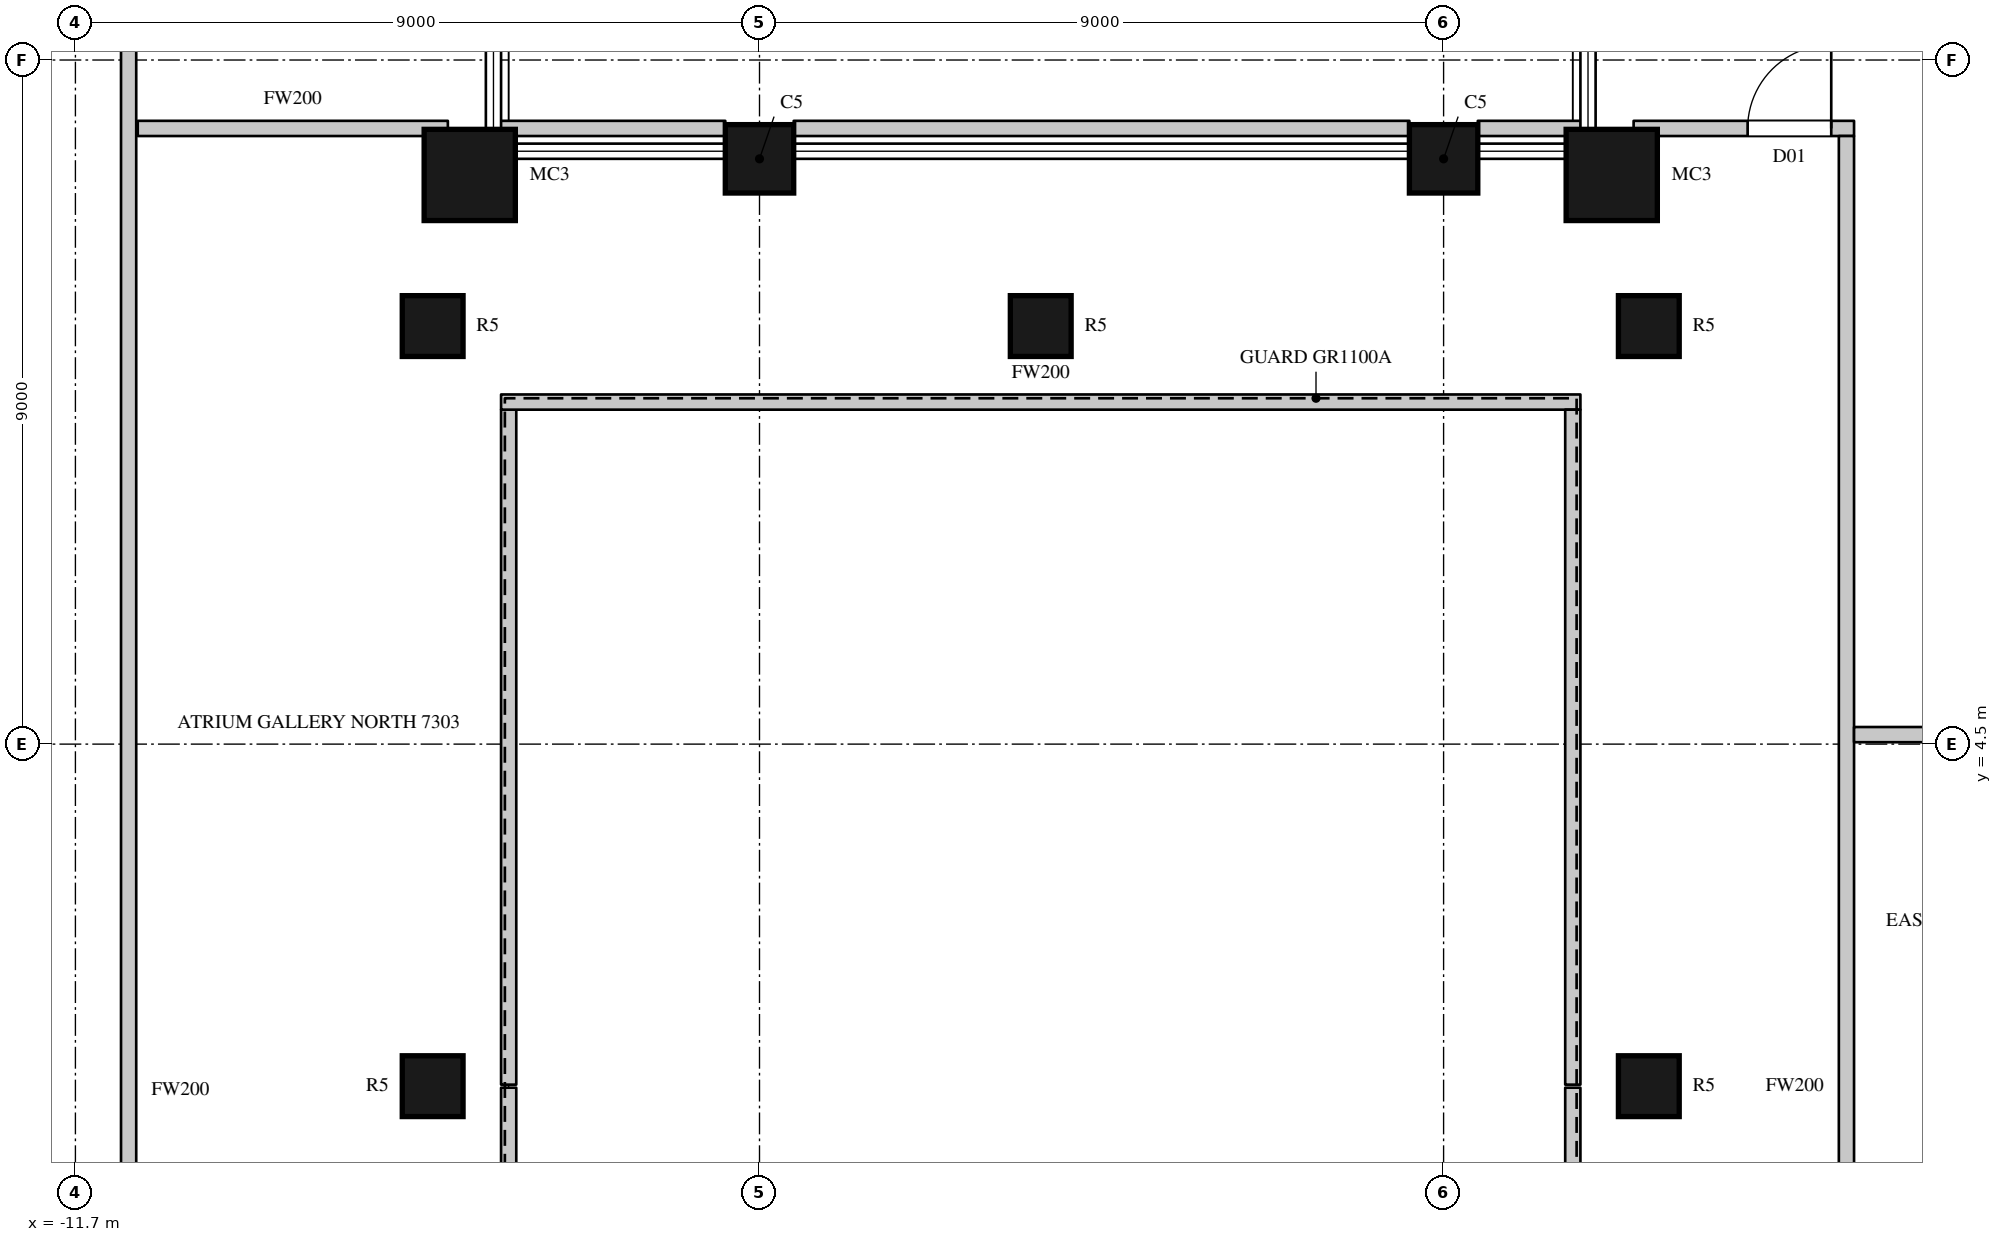
"""IFC4 building model, lengths in metres.
Left out: names, types, materials, properties, quantities, classifications, styles, units other than length and angle.
Written with IfcOpenShell. Run it as: python <this file> out.ifc"""

import sys

from ifc_helpers import new_model, si_unit, direction, frame, frame_2d, origin, origin_2d, place, context, subcontext, project, spatial, rectangle, circle, extrude, element, fill, save


model = new_model("IFC4")
c1 = context("Model", 3, precision=1e-05, world=origin(), true_north=direction((0.0, 1.0)))
c2 = subcontext(c1, "Body", "Model", "MODEL_VIEW")
j1 = project(units=[si_unit("LENGTHUNIT", "METRE"), si_unit("PLANEANGLEUNIT", "RADIAN")], contexts=[c1])
p1 = place(None, origin())
s1 = spatial("IfcSite", under=j1, at=p1, CompositionType="ELEMENT")
p2 = place(p1, origin())
s2 = spatial("IfcBuilding", under=s1, at=p2, CompositionType="ELEMENT")
p3 = place(p2, frame((0.0, 0.0, 321.3)))
s3 = spatial("IfcBuildingStorey", under=s2, at=p3, CompositionType="ELEMENT", Elevation=321.3)
p4 = place(p3, frame((8.512, 11.988, 0.0), z_axis=(0.0, 0.0, 1.0), x_axis=(1.0, 0.0, 0.0)))
e1 = element("IfcColumn", 1, at=p4, inside=s3, PredefinedType="COLUMN", context=c2, shape_type="SweptSolid", body=[
    extrude(circle(Radius=0.6, at=origin_2d()), origin(), (0.0, 0.0, 1.0), 4.1),
])
for number, where, z_axis, x_axis in (
    (2, (6.3, 12.2, 0.0), (0.0, 0.0, 1.0), (-1.0, 0.0, 0.0)),
    (3, (-2.7, 12.2, 0.0), (0.0, 0.0, 1.0), (-1.0, 0.0, 0.0)),
):
    element("IfcColumn", number, at=place(p3, frame(where, z_axis=z_axis, x_axis=x_axis)), inside=s3, PredefinedType="COLUMN", context=c2, shape_type="SweptSolid", body=[
        extrude(rectangle(XDim=0.9, YDim=0.9, at=origin_2d()), origin(), (0.0, 0.0, 1.0), 4.1),
    ])
p5 = place(p3, frame((-6.512, 11.988, 0.0), z_axis=(0.0, 0.0, 1.0), x_axis=(1.0, 0.0, 0.0)))
e4 = element("IfcColumn", 4, at=p5, inside=s3, PredefinedType="COLUMN", context=c2, shape_type="SweptSolid", body=[
    extrude(circle(Radius=0.6, at=origin_2d()), origin(), (0.0, 0.0, 1.0), 4.1),
])
for number, where, z_axis, x_axis in (
    (5, (-7.0, 0.0, 0.0), (0.0, 0.0, 1.0), (1.0, 0.0, 0.0)),
    (6, (-7.0, 10.0, 0.0), (0.0, 0.0, 1.0), (1.0, 0.0, 0.0)),
    (7, (1.0, 10.0, 0.0), (0.0, 0.0, 1.0), (1.0, 0.0, 0.0)),
    (8, (9.0, 0.0, 0.0), (0.0, 0.0, 1.0), (1.0, 0.0, 0.0)),
    (9, (9.0, 10.0, 0.0), (0.0, 0.0, 1.0), (1.0, 0.0, 0.0)),
):
    element("IfcColumn", number, at=place(p3, frame(where, z_axis=z_axis, x_axis=x_axis)), inside=s3, PredefinedType="COLUMN", context=c2, shape_type="SweptSolid", body=[
        extrude(circle(Radius=0.4, at=origin_2d()), origin(), (0.0, 0.0, 1.0), 4.1),
    ])
p6 = place(p3, frame((-11.0, -14.8, 0.0), z_axis=(0.0, 0.0, 1.0), x_axis=(0.0, 1.0, 0.0)))
e10 = element("IfcWall", 10, at=p6, inside=s3, PredefinedType="PARTITIONING", context=c2, shape_type="SweptSolid", body=[
    extrude(rectangle(XDim=29.5, YDim=0.2, at=frame_2d((14.75, 0.0))), origin(), (0.0, 0.0, 1.0), 3.8),
])
p7 = place(p6, frame((7.75, 0.0, 0.0)))
e11 = element("IfcOpeningElement", 11, at=p7, cuts=e10, PredefinedType="OPENING", context=c2, shape_type="SweptSolid", body=[
    extrude(rectangle(XDim=1.5, YDim=2.4, at=frame_2d((0.75, 1.2))), frame((0.0, 0.11, 0.0), z_axis=(0.0, -1.0, 0.0), x_axis=(1.0, 0.0, 0.0)), (0.0, 0.0, 1.0), 0.22),
])
p8 = place(p3, frame((-10.88, 12.6, 0.0), z_axis=(0.0, 0.0, 1.0), x_axis=(1.0, 0.0, 0.0)))
e12 = element("IfcWall", 12, at=p8, inside=s3, PredefinedType="PARTITIONING", context=c2, shape_type="SweptSolid", body=[
    extrude(rectangle(XDim=4.08, YDim=0.2, at=frame_2d((2.04, 0.0))), origin(), (0.0, 0.0, 1.0), 3.8),
])
p9 = place(p3, frame((-6.23, 12.6, 0.0), z_axis=(0.0, 0.0, 1.0), x_axis=(1.0, 0.0, 0.0)))
e13 = element("IfcWall", 13, at=p9, inside=s3, PredefinedType="PARTITIONING", context=c2, shape_type="SweptSolid", body=[
    extrude(rectangle(XDim=3.08, YDim=0.2, at=frame_2d((1.54, 0.0))), origin(), (0.0, 0.0, 1.0), 3.8),
])
p10 = place(p3, frame((-2.25, 12.6, 0.0), z_axis=(0.0, 0.0, 1.0), x_axis=(1.0, 0.0, 0.0)))
e14 = element("IfcWall", 14, at=p10, inside=s3, PredefinedType="PARTITIONING", context=c2, shape_type="SweptSolid", body=[
    extrude(rectangle(XDim=8.1, YDim=0.2, at=frame_2d((4.05, 0.0))), origin(), (0.0, 0.0, 1.0), 3.8),
])
p11 = place(p3, frame((6.75, 12.6, 0.0), z_axis=(0.0, 0.0, 1.0), x_axis=(1.0, 0.0, 0.0)))
e15 = element("IfcWall", 15, at=p11, inside=s3, PredefinedType="PARTITIONING", context=c2, shape_type="SweptSolid", body=[
    extrude(rectangle(XDim=1.48, YDim=0.2, at=frame_2d((0.74, 0.0))), origin(), (0.0, 0.0, 1.0), 3.8),
])
for number, where, z_axis, x_axis in (
    (16, (-6.0, -8.9, 0.0), (0.0, 0.0, 1.0), (0.0, 1.0, 0.0)),
    (17, (-6.0, 0.02, 0.0), (0.0, 0.0, 1.0), (0.0, 1.0, 0.0)),
):
    element("IfcWall", number, at=place(p3, frame(where, z_axis=z_axis, x_axis=x_axis)), inside=s3, PredefinedType="PARTITIONING", context=c2, shape_type="SweptSolid", body=[
        extrude(rectangle(XDim=8.88, YDim=0.2, at=frame_2d((4.44, 0.0))), origin(), (0.0, 0.0, 1.0), 3.8),
    ])
p12 = place(p3, frame((-6.1, 9.0, 0.0), z_axis=(0.0, 0.0, 1.0), x_axis=(1.0, 0.0, 0.0)))
e18 = element("IfcWall", 18, at=p12, inside=s3, PredefinedType="PARTITIONING", context=c2, shape_type="SweptSolid", body=[
    extrude(rectangle(XDim=14.2, YDim=0.2, at=frame_2d((7.1, 0.0))), origin(), (0.0, 0.0, 1.0), 3.8),
])
for number, where, z_axis, x_axis in (
    (19, (8.0, -8.9, 0.0), (0.0, 0.0, 1.0), (0.0, 1.0, 0.0)),
    (20, (8.0, 0.02, 0.0), (0.0, 0.0, 1.0), (0.0, 1.0, 0.0)),
):
    element("IfcWall", number, at=place(p3, frame(where, z_axis=z_axis, x_axis=x_axis)), inside=s3, PredefinedType="PARTITIONING", context=c2, shape_type="SweptSolid", body=[
        extrude(rectangle(XDim=8.88, YDim=0.2, at=frame_2d((4.44, 0.0))), origin(), (0.0, 0.0, 1.0), 3.8),
    ])
p13 = place(p3, frame((8.8, 12.6, 0.0), z_axis=(0.0, 0.0, 1.0), x_axis=(1.0, 0.0, 0.0)))
e21 = element("IfcWall", 21, at=p13, inside=s3, PredefinedType="PARTITIONING", context=c2, shape_type="SweptSolid", body=[
    extrude(rectangle(XDim=2.9, YDim=0.2, at=frame_2d((1.45, 0.0))), origin(), (0.0, 0.0, 1.0), 3.8),
])
p14 = place(p13, frame((1.5, 0.0, 0.0)))
e22 = element("IfcOpeningElement", 22, at=p14, cuts=e21, PredefinedType="OPENING", context=c2, shape_type="SweptSolid", body=[
    extrude(rectangle(XDim=1.1, YDim=2.4, at=frame_2d((0.55, 1.2))), frame((0.0, 0.11, 0.0), z_axis=(0.0, -1.0, 0.0), x_axis=(1.0, 0.0, 0.0)), (0.0, 0.0, 1.0), 0.22),
])
p15 = place(p3, frame((11.6, -12.5, 0.0), z_axis=(0.0, 0.0, 1.0), x_axis=(0.0, 1.0, 0.0)))
e23 = element("IfcWall", 23, at=p15, inside=s3, PredefinedType="PARTITIONING", context=c2, shape_type="SweptSolid", body=[
    extrude(rectangle(XDim=25.0, YDim=0.2, at=frame_2d((12.5, 0.0))), origin(), (0.0, 0.0, 1.0), 3.8),
])
p16 = place(p15, frame((9.4, 0.0, 0.0)))
e24 = element("IfcOpeningElement", 24, at=p16, cuts=e23, PredefinedType="OPENING", context=c2, shape_type="SweptSolid", body=[
    extrude(rectangle(XDim=1.5, YDim=2.4, at=frame_2d((0.75, 1.2))), frame((0.0, 0.11, 0.0), z_axis=(0.0, -1.0, 0.0), x_axis=(1.0, 0.0, 0.0)), (0.0, 0.0, 1.0), 0.22),
])
p17 = place(p15, frame((5.5, 0.0, 0.0)))
e25 = element("IfcOpeningElement", 25, at=p17, cuts=e23, PredefinedType="OPENING", context=c2, shape_type="SweptSolid", body=[
    extrude(rectangle(XDim=1.1, YDim=2.4, at=frame_2d((0.55, 1.2))), frame((0.0, 0.11, 0.0), z_axis=(0.0, -1.0, 0.0), x_axis=(1.0, 0.0, 0.0)), (0.0, 0.0, 1.0), 0.22),
])
p18 = place(p3, frame((11.7, 4.625, 0.0), z_axis=(0.0, 0.0, 1.0), x_axis=(1.0, 0.0, 0.0)))
e26 = element("IfcWall", 26, at=p18, inside=s3, PredefinedType="PARTITIONING", context=c2, shape_type="SweptSolid", body=[
    extrude(rectangle(XDim=2.975, YDim=0.2, at=frame_2d((1.488, 0.0))), origin(), (0.0, 0.0, 1.0), 3.8),
])
p19 = place(p14, origin())
e27 = element("IfcDoor", 27, at=p19, inside=s3, OperationType="SINGLE_SWING_RIGHT", PredefinedType="DOOR", context=c2, shape_type="SweptSolid", body=[
    extrude(rectangle(XDim=1.1, YDim=2.4, at=frame_2d((0.55, 1.2))), frame((0.0, 0.025, 0.0), z_axis=(0.0, -1.0, 0.0), x_axis=(1.0, 0.0, 0.0)), (0.0, 0.0, 1.0), 0.05),
])
fill(e22, e27)
save(model, sys.argv[1])
